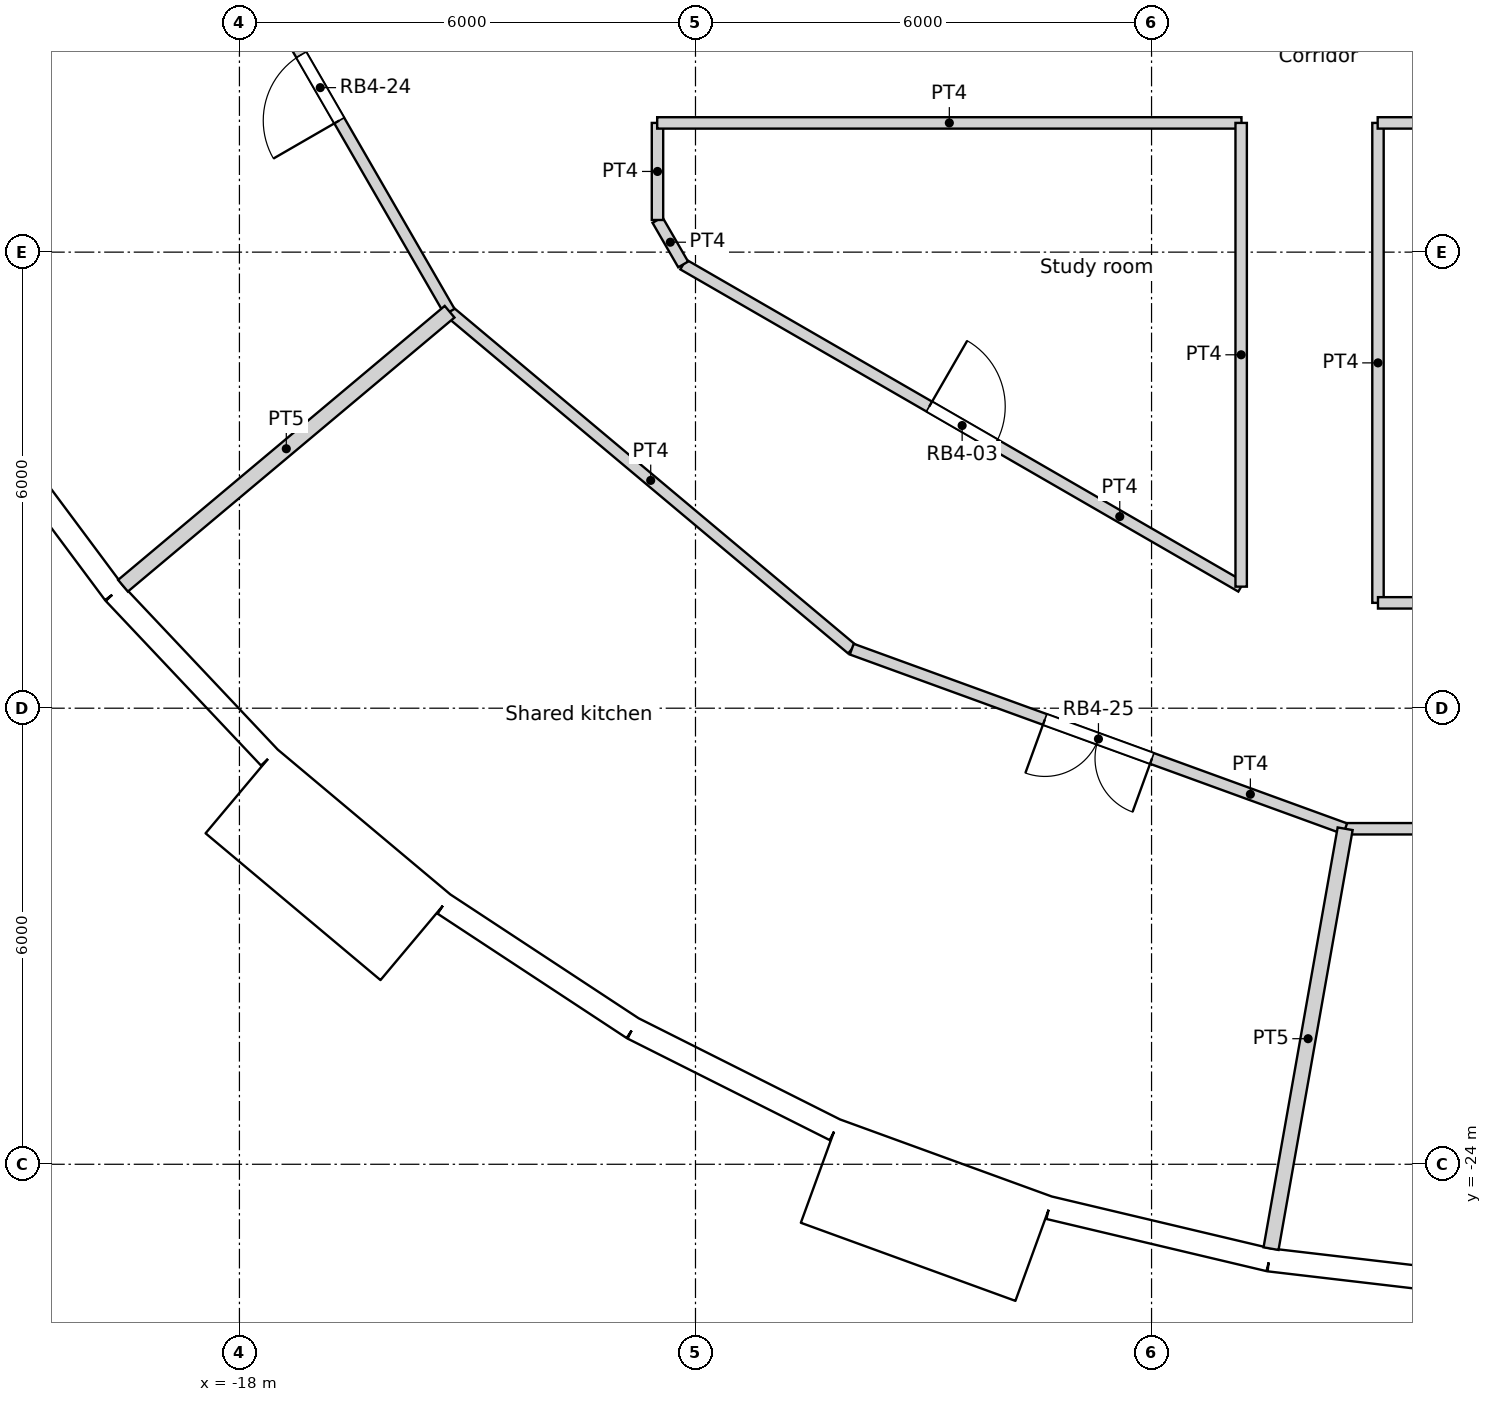
"""IFC4 building model, lengths in metres.
Left out: names, types, materials, properties, quantities, classifications, styles, units other than length and angle.
Written with IfcOpenShell. Run it as: python <this file> out.ifc"""

import sys

from ifc_helpers import new_model, si_unit, direction, frame, frame_2d, origin, origin_2d, place, context, subcontext, project, spatial, rectangle, circle, extrude, element, fill, save


model = new_model("IFC4")
c1 = context("Model", 3, precision=1e-05, world=origin(), true_north=direction((0.0, 1.0)))
c2 = subcontext(c1, "Body", "Model", "MODEL_VIEW")
j1 = project(units=[si_unit("LENGTHUNIT", "METRE"), si_unit("PLANEANGLEUNIT", "RADIAN")], contexts=[c1])
p1 = place(None, origin())
s1 = spatial("IfcSite", under=j1, at=p1, CompositionType="ELEMENT")
p2 = place(p1, origin())
s2 = spatial("IfcBuilding", under=s1, at=p2, CompositionType="ELEMENT")
p3 = place(p2, frame((0.0, 0.0, 158.4)))
s3 = spatial("IfcBuildingStorey", under=s2, at=p3, CompositionType="ELEMENT", Elevation=158.4)
for number, where, z_axis, x_axis in (
    (1, (-20.509, -13.489, 0.0), (0.0, 0.0, 1.0), (1.0, 0.0, 0.0)),
    (2, (-16.846, -17.855, 0.0), (0.0, 0.0, 1.0), (1.0, 0.0, 0.0)),
    (3, (-12.274, -21.259, 0.0), (0.0, 0.0, 1.0), (1.0, 0.0, 0.0)),
    (4, (-7.04, -23.516, 0.0), (0.0, 0.0, 1.0), (1.0, 0.0, 0.0)),
):
    element("IfcColumn", number, at=place(p3, frame(where, z_axis=z_axis, x_axis=x_axis)), inside=s3, PredefinedType="COLUMN", context=c2, shape_type="SweptSolid", body=[
        extrude(circle(Radius=0.6, at=origin_2d()), origin(), (0.0, 0.0, 1.0), 3.6),
    ])
for number, where, z_axis, x_axis in (
    (5, (-13.798, -12.802, 0.0), (0.0, 0.0, 1.0), (1.0, 0.0, 0.0)),
    (6, (-9.411, -16.301, 0.0), (0.0, 0.0, 1.0), (1.0, 0.0, 0.0)),
    (7, (-4.188, -18.35, 0.0), (0.0, 0.0, 1.0), (1.0, 0.0, 0.0)),
):
    element("IfcColumn", number, at=place(p3, frame(where, z_axis=z_axis, x_axis=x_axis)), inside=s3, PredefinedType="COLUMN", context=c2, shape_type="SweptSolid", body=[
        extrude(circle(Radius=0.65, at=origin_2d()), origin(), (0.0, 0.0, 1.0), 3.6),
    ])
p4 = place(p3, frame((-21.422, -14.101, 0.0), z_axis=(0.0, 0.0, 1.0), x_axis=(0.597197580538, -0.80209416517, 0.0)))
e8 = element("IfcWall", 8, at=p4, inside=s3, PredefinedType="SOLIDWALL", context=c2, shape_type="SweptSolid", body=[
    extrude(rectangle(XDim=2.973, YDim=0.3, at=frame_2d((1.486, 0.0))), origin(), (0.0, 0.0, 1.0), 3.3),
])
p5 = place(p4, frame((1.486, 0.0, 1.55)))
e9 = element("IfcOpeningElement", 9, at=p5, cuts=e8, PredefinedType="OPENING", context=c2, shape_type="SweptSolid", body=[
    extrude(circle(Radius=0.9, at=origin_2d()), frame((0.0, 0.16, 0.0), z_axis=(0.0, -1.0, 0.0), x_axis=(1.0, 0.0, 0.0)), (0.0, 0.0, 1.0), 0.32),
])
p6 = place(p3, frame((-19.647, -16.486, 0.0), z_axis=(0.0, 0.0, 1.0), x_axis=(0.686235184166, -0.727379730273, 0.0)))
e10 = element("IfcWall", 10, at=p6, inside=s3, PredefinedType="SOLIDWALL", context=c2, shape_type="SweptSolid", body=[
    extrude(rectangle(XDim=2.973, YDim=0.3, at=frame_2d((1.486, 0.0))), origin(), (0.0, 0.0, 1.0), 3.3),
])
p7 = place(p6, frame((1.486, 0.0, 1.55)))
e11 = element("IfcOpeningElement", 11, at=p7, cuts=e10, PredefinedType="OPENING", context=c2, shape_type="SweptSolid", body=[
    extrude(circle(Radius=0.9, at=origin_2d()), frame((0.0, 0.16, 0.0), z_axis=(0.0, -1.0, 0.0), x_axis=(1.0, 0.0, 0.0)), (0.0, 0.0, 1.0), 0.32),
])
p8 = place(p3, frame((-17.977, -19.09, -0.3), z_axis=(0.0, 0.0, 1.0), x_axis=(0.766022196139, -0.642814121673, 0.0)))
e12 = element("IfcWall", 12, at=p8, inside=s3, PredefinedType="ELEMENTEDWALL", context=c2, shape_type="SweptSolid", body=[
    extrude(rectangle(XDim=3.0, YDim=1.45, at=frame_2d((1.5, 0.0))), origin(), (0.0, 0.0, 1.0), 3.6),
])
p9 = place(p8, frame((1.5, 0.0, 1.85)))
e13 = element("IfcOpeningElement", 13, at=p9, cuts=e12, PredefinedType="OPENING", context=c2, shape_type="SweptSolid", body=[
    extrude(circle(Radius=0.9, at=origin_2d()), frame((0.0, 0.735, 0.0), z_axis=(0.0, -1.0, 0.0), x_axis=(1.0, 0.0, 0.0)), (0.0, 0.0, 1.0), 1.47),
])
p10 = place(p3, frame((-15.308, -20.578, 0.0), z_axis=(0.0, 0.0, 1.0), x_axis=(0.835470659512, -0.549535055382, 0.0)))
e14 = element("IfcWall", 14, at=p10, inside=s3, PredefinedType="SOLIDWALL", context=c2, shape_type="SweptSolid", body=[
    extrude(rectangle(XDim=2.973, YDim=0.3, at=frame_2d((1.487, 0.0))), origin(), (0.0, 0.0, 1.0), 3.3),
])
p11 = place(p10, frame((1.486, 0.0, 1.55)))
e15 = element("IfcOpeningElement", 15, at=p11, cuts=e14, PredefinedType="OPENING", context=c2, shape_type="SweptSolid", body=[
    extrude(circle(Radius=0.9, at=origin_2d()), frame((0.0, 0.16, 0.0), z_axis=(0.0, -1.0, 0.0), x_axis=(1.0, 0.0, 0.0)), (0.0, 0.0, 1.0), 0.32),
])
p12 = place(p3, frame((-12.824, -22.211, 0.0), z_axis=(0.0, 0.0, 1.0), x_axis=(0.893637442555, -0.448789618045, 0.0)))
e16 = element("IfcWall", 16, at=p12, inside=s3, PredefinedType="SOLIDWALL", context=c2, shape_type="SweptSolid", body=[
    extrude(rectangle(XDim=2.973, YDim=0.3, at=frame_2d((1.486, 0.0))), origin(), (0.0, 0.0, 1.0), 3.3),
])
p13 = place(p12, frame((1.486, 0.0, 1.55)))
e17 = element("IfcOpeningElement", 17, at=p13, cuts=e16, PredefinedType="OPENING", context=c2, shape_type="SweptSolid", body=[
    extrude(circle(Radius=0.9, at=origin_2d()), frame((0.0, 0.16, 0.0), z_axis=(0.0, -1.0, 0.0), x_axis=(1.0, 0.0, 0.0)), (0.0, 0.0, 1.0), 0.32),
])
p14 = place(p3, frame((-10.363, -24.087, -0.3), z_axis=(0.0, 0.0, 1.0), x_axis=(0.939686455819, -0.342037080957, 0.0)))
e18 = element("IfcWall", 18, at=p14, inside=s3, PredefinedType="ELEMENTEDWALL", context=c2, shape_type="SweptSolid", body=[
    extrude(rectangle(XDim=3.0, YDim=1.45, at=frame_2d((1.5, 0.0))), origin(), (0.0, 0.0, 1.0), 3.6),
])
p15 = place(p14, frame((1.5, 0.0, 1.85)))
e19 = element("IfcOpeningElement", 19, at=p15, cuts=e18, PredefinedType="OPENING", context=c2, shape_type="SweptSolid", body=[
    extrude(circle(Radius=0.9, at=origin_2d()), frame((0.0, 0.735, 0.0), z_axis=(0.0, -1.0, 0.0), x_axis=(1.0, 0.0, 0.0)), (0.0, 0.0, 1.0), 1.47),
])
p16 = place(p3, frame((-7.346, -24.572, 0.0), z_axis=(0.0, 0.0, 1.0), x_axis=(0.973049746156, -0.230595298102, 0.0)))
e20 = element("IfcWall", 20, at=p16, inside=s3, PredefinedType="SOLIDWALL", context=c2, shape_type="SweptSolid", body=[
    extrude(rectangle(XDim=2.973, YDim=0.3, at=frame_2d((1.486, 0.0))), origin(), (0.0, 0.0, 1.0), 3.3),
])
p17 = place(p16, frame((1.486, 0.0, 1.55)))
e21 = element("IfcOpeningElement", 21, at=p17, cuts=e20, PredefinedType="OPENING", context=c2, shape_type="SweptSolid", body=[
    extrude(circle(Radius=0.9, at=origin_2d()), frame((0.0, 0.16, 0.0), z_axis=(0.0, -1.0, 0.0), x_axis=(1.0, 0.0, 0.0)), (0.0, 0.0, 1.0), 0.32),
])
p18 = place(p3, frame((-4.454, -25.258, 0.0), z_axis=(0.0, 0.0, 1.0), x_axis=(0.993235542767, -0.116116995244, 0.0)))
e22 = element("IfcWall", 22, at=p18, inside=s3, PredefinedType="SOLIDWALL", context=c2, shape_type="SweptSolid", body=[
    extrude(rectangle(XDim=2.973, YDim=0.3, at=frame_2d((1.486, 0.0))), origin(), (0.0, 0.0, 1.0), 3.3),
])
p19 = place(p18, frame((1.486, 0.0, 1.55)))
e23 = element("IfcOpeningElement", 23, at=p19, cuts=e22, PredefinedType="OPENING", context=c2, shape_type="SweptSolid", body=[
    extrude(circle(Radius=0.9, at=origin_2d()), frame((0.0, 0.16, 0.0), z_axis=(0.0, -1.0, 0.0), x_axis=(1.0, 0.0, 0.0)), (0.0, 0.0, 1.0), 0.32),
])
p20 = place(p3, frame((-12.504, -10.3, 0.0), z_axis=(0.0, 0.0, 1.0), x_axis=(1.0, 0.0, 0.0)))
e24 = element("IfcWall", 24, at=p20, inside=s3, PredefinedType="PARTITIONING", context=c2, shape_type="SweptSolid", body=[
    extrude(rectangle(XDim=7.687, YDim=0.15, at=frame_2d((3.844, 0.0))), origin(), (0.0, 0.0, 1.0), 3.3),
])
p21 = place(p3, frame((-3.025, -10.3, 0.0), z_axis=(0.0, 0.0, 1.0), x_axis=(1.0, 0.0, 0.0)))
e25 = element("IfcWall", 25, at=p21, inside=s3, PredefinedType="PARTITIONING", context=c2, shape_type="SweptSolid", body=[
    extrude(rectangle(XDim=16.262, YDim=0.15, at=frame_2d((8.131, 0.0))), origin(), (0.0, 0.0, 1.0), 3.3),
])
p22 = place(p21, frame((7.287, 0.0, 0.0)))
e26 = element("IfcOpeningElement", 26, at=p22, cuts=e25, PredefinedType="OPENING", context=c2, shape_type="SweptSolid", body=[
    extrude(rectangle(XDim=0.95, YDim=2.1, at=frame_2d((0.475, 1.05))), frame((0.0, 0.075, 0.0), z_axis=(0.0, -1.0, 0.0), x_axis=(1.0, 0.0, 0.0)), (0.0, 0.0, 1.0), 0.15),
])
p23 = place(p3, frame((-12.5, -11.577, 0.0), z_axis=(0.0, 0.0, 1.0), x_axis=(0.0, 1.0, 0.0)))
e27 = element("IfcWall", 27, at=p23, inside=s3, PredefinedType="PARTITIONING", context=c2, shape_type="SweptSolid", body=[
    extrude(rectangle(XDim=1.277, YDim=0.15, at=frame_2d((0.638, 0.0))), origin(), (0.0, 0.0, 1.0), 3.3),
])
p24 = place(p3, frame((-12.5, -11.577, 0.0), z_axis=(0.0, 0.0, 1.0), x_axis=(0.500024767483, -0.866011103799, 0.0)))
e28 = element("IfcWall", 28, at=p24, inside=s3, PredefinedType="PARTITIONING", context=c2, shape_type="SweptSolid", body=[
    extrude(rectangle(XDim=0.676, YDim=0.15, at=frame_2d((0.338, 0.0))), origin(), (0.0, 0.0, 1.0), 3.3),
])
p25 = place(p3, frame((-18.688, -6.802, 0.0), z_axis=(0.0, 0.0, 1.0), x_axis=(0.499914202267, -0.866074933462, 0.0)))
e29 = element("IfcWall", 29, at=p25, inside=s3, PredefinedType="PARTITIONING", context=c2, shape_type="SweptSolid", body=[
    extrude(rectangle(XDim=6.907, YDim=0.15, at=frame_2d((3.454, 0.0))), origin(), (0.0, 0.0, 1.0), 3.3),
])
p26 = place(p25, frame((3.003, 0.0, 0.0)))
e30 = element("IfcOpeningElement", 30, at=p26, cuts=e29, PredefinedType="OPENING", context=c2, shape_type="SweptSolid", body=[
    extrude(rectangle(XDim=1.0, YDim=2.04, at=frame_2d((0.5, 1.02))), frame((0.0, 0.075, 0.0), z_axis=(0.0, -1.0, 0.0), x_axis=(1.0, 0.0, 0.0)), (0.0, 0.0, 1.0), 0.15),
])
p27 = place(p3, frame((-15.235, -12.784, 0.0), z_axis=(0.0, 0.0, 1.0), x_axis=(0.766192104565, -0.642611592567, 0.0)))
e31 = element("IfcWall", 31, at=p27, inside=s3, PredefinedType="PARTITIONING", context=c2, shape_type="SweptSolid", body=[
    extrude(rectangle(XDim=6.906, YDim=0.15, at=frame_2d((3.453, 0.0))), origin(), (0.0, 0.0, 1.0), 3.3),
])
p28 = place(p3, frame((-12.162, -12.162, 0.0), z_axis=(0.0, 0.0, 1.0), x_axis=(0.866004766557, -0.500035743023, 0.0)))
e32 = element("IfcWall", 32, at=p28, inside=s3, PredefinedType="PARTITIONING", context=c2, shape_type="SweptSolid", body=[
    extrude(rectangle(XDim=8.477, YDim=0.15, at=frame_2d((4.239, 0.0))), origin(), (0.0, 0.0, 1.0), 3.3),
])
p29 = place(p28, frame((3.738, 0.0, 0.0)))
e33 = element("IfcOpeningElement", 33, at=p29, cuts=e32, PredefinedType="OPENING", context=c2, shape_type="SweptSolid", body=[
    extrude(rectangle(XDim=1.0, YDim=2.04, at=frame_2d((0.5, 1.02))), frame((0.0, 0.075, 0.0), z_axis=(0.0, -1.0, 0.0), x_axis=(1.0, 0.0, 0.0)), (0.0, 0.0, 1.0), 0.15),
])
p30 = place(p3, frame((-4.821, -16.401, 0.0), z_axis=(0.0, 0.0, 1.0), x_axis=(0.0, 1.0, 0.0)))
e34 = element("IfcWall", 34, at=p30, inside=s3, PredefinedType="PARTITIONING", context=c2, shape_type="SweptSolid", body=[
    extrude(rectangle(XDim=6.101, YDim=0.15, at=frame_2d((3.05, 0.0))), origin(), (0.0, 0.0, 1.0), 3.3),
])
p31 = place(p3, frame((-3.021, -16.614, 0.0), z_axis=(0.0, 0.0, 1.0), x_axis=(0.0, 1.0, 0.0)))
e35 = element("IfcWall", 35, at=p31, inside=s3, PredefinedType="PARTITIONING", context=c2, shape_type="SweptSolid", body=[
    extrude(rectangle(XDim=6.314, YDim=0.15, at=frame_2d((3.157, 0.0))), origin(), (0.0, 0.0, 1.0), 3.3),
])
p32 = place(p3, frame((-3.021, -16.614, 0.0), z_axis=(0.0, 0.0, 1.0), x_axis=(1.0, 0.0, 0.0)))
e36 = element("IfcWall", 36, at=p32, inside=s3, PredefinedType="PARTITIONING", context=c2, shape_type="SweptSolid", body=[
    extrude(rectangle(XDim=7.473, YDim=0.15, at=frame_2d((3.736, 0.0))), origin(), (0.0, 0.0, 1.0), 3.3),
])
p33 = place(p3, frame((-9.944, -17.223, 0.0), z_axis=(0.0, 0.0, 1.0), x_axis=(0.939672634566, -0.342075050021, 0.0)))
e37 = element("IfcWall", 37, at=p33, inside=s3, PredefinedType="PARTITIONING", context=c2, shape_type="SweptSolid", body=[
    extrude(rectangle(XDim=6.908, YDim=0.15, at=frame_2d((3.454, 0.0))), origin(), (0.0, 0.0, 1.0), 3.3),
])
p34 = place(p33, frame((2.704, 0.0, 0.0)))
e38 = element("IfcOpeningElement", 38, at=p34, cuts=e37, PredefinedType="OPENING", context=c2, shape_type="SweptSolid", body=[
    extrude(rectangle(XDim=1.5, YDim=2.1, at=frame_2d((0.75, 1.05))), frame((0.0, 0.075, 0.0), z_axis=(0.0, -1.0, 0.0), x_axis=(1.0, 0.0, 0.0)), (0.0, 0.0, 1.0), 0.15),
])
p35 = place(p3, frame((-3.453, -19.586, 0.0), z_axis=(0.0, 0.0, 1.0), x_axis=(1.0, 0.0, 0.0)))
e39 = element("IfcWall", 39, at=p35, inside=s3, PredefinedType="PARTITIONING", context=c2, shape_type="SweptSolid", body=[
    extrude(rectangle(XDim=6.906, YDim=0.15, at=frame_2d((3.453, 0.0))), origin(), (0.0, 0.0, 1.0), 3.3),
])
p36 = place(p35, frame((2.103, 0.0, 0.0)))
e40 = element("IfcOpeningElement", 40, at=p36, cuts=e39, PredefinedType="OPENING", context=c2, shape_type="SweptSolid", body=[
    extrude(rectangle(XDim=1.8, YDim=2.1, at=frame_2d((0.9, 1.05))), frame((0.0, 0.075, 0.0), z_axis=(0.0, -1.0, 0.0), x_axis=(1.0, 0.0, 0.0)), (0.0, 0.0, 1.0), 0.15),
])
p37 = place(p3, frame((-19.532, -16.389, 0.0), z_axis=(0.0, 0.0, 1.0), x_axis=(0.76609059793, 0.642732600514, 0.0)))
e41 = element("IfcWall", 41, at=p37, inside=s3, PredefinedType="PARTITIONING", context=c2, shape_type="SweptSolid", body=[
    extrude(rectangle(XDim=5.609, YDim=0.2, at=frame_2d((2.804, 0.0))), origin(), (0.0, 0.0, 1.0), 3.3),
])
p38 = place(p3, frame((-4.428, -25.11, 0.0), z_axis=(0.0, 0.0, 1.0), x_axis=(0.17382754149, 0.984776109489, 0.0)))
e42 = element("IfcWall", 42, at=p38, inside=s3, PredefinedType="PARTITIONING", context=c2, shape_type="SweptSolid", body=[
    extrude(rectangle(XDim=5.61, YDim=0.2, at=frame_2d((2.805, 0.0))), origin(), (0.0, 0.0, 1.0), 3.3),
])
p39 = place(p5, origin())
e43 = element("IfcWindow", 43, at=p39, inside=s3, PartitioningType="SINGLE_PANEL", PredefinedType="WINDOW", context=c2, shape_type="SweptSolid", body=[
    extrude(circle(Radius=0.9, at=origin_2d()), frame((0.0, 0.12, 0.0), z_axis=(0.0, -1.0, 0.0), x_axis=(1.0, 0.0, 0.0)), (0.0, 0.0, 1.0), 0.1),
])
fill(e9, e43)
p40 = place(p7, origin())
e44 = element("IfcWindow", 44, at=p40, inside=s3, PartitioningType="SINGLE_PANEL", PredefinedType="WINDOW", context=c2, shape_type="SweptSolid", body=[
    extrude(circle(Radius=0.9, at=origin_2d()), frame((0.0, 0.12, 0.0), z_axis=(0.0, -1.0, 0.0), x_axis=(1.0, 0.0, 0.0)), (0.0, 0.0, 1.0), 0.1),
])
fill(e11, e44)
p41 = place(p9, origin())
e45 = element("IfcWindow", 45, at=p41, inside=s3, PartitioningType="SINGLE_PANEL", PredefinedType="WINDOW", context=c2, shape_type="SweptSolid", body=[
    extrude(circle(Radius=0.9, at=origin_2d()), frame((0.0, 0.695, 0.0), z_axis=(0.0, -1.0, 0.0), x_axis=(1.0, 0.0, 0.0)), (0.0, 0.0, 1.0), 0.1),
])
fill(e13, e45)
p42 = place(p11, origin())
e46 = element("IfcWindow", 46, at=p42, inside=s3, PartitioningType="SINGLE_PANEL", PredefinedType="WINDOW", context=c2, shape_type="SweptSolid", body=[
    extrude(circle(Radius=0.9, at=origin_2d()), frame((0.0, 0.12, 0.0), z_axis=(0.0, -1.0, 0.0), x_axis=(1.0, 0.0, 0.0)), (0.0, 0.0, 1.0), 0.1),
])
fill(e15, e46)
p43 = place(p13, origin())
e47 = element("IfcWindow", 47, at=p43, inside=s3, PartitioningType="SINGLE_PANEL", PredefinedType="WINDOW", context=c2, shape_type="SweptSolid", body=[
    extrude(circle(Radius=0.9, at=origin_2d()), frame((0.0, 0.12, 0.0), z_axis=(0.0, -1.0, 0.0), x_axis=(1.0, 0.0, 0.0)), (0.0, 0.0, 1.0), 0.1),
])
fill(e17, e47)
p44 = place(p15, origin())
e48 = element("IfcWindow", 48, at=p44, inside=s3, PartitioningType="SINGLE_PANEL", PredefinedType="WINDOW", context=c2, shape_type="SweptSolid", body=[
    extrude(circle(Radius=0.9, at=origin_2d()), frame((0.0, 0.695, 0.0), z_axis=(0.0, -1.0, 0.0), x_axis=(1.0, 0.0, 0.0)), (0.0, 0.0, 1.0), 0.1),
])
fill(e19, e48)
p45 = place(p17, origin())
e49 = element("IfcWindow", 49, at=p45, inside=s3, PartitioningType="SINGLE_PANEL", PredefinedType="WINDOW", context=c2, shape_type="SweptSolid", body=[
    extrude(circle(Radius=0.9, at=origin_2d()), frame((0.0, 0.12, 0.0), z_axis=(0.0, -1.0, 0.0), x_axis=(1.0, 0.0, 0.0)), (0.0, 0.0, 1.0), 0.1),
])
fill(e21, e49)
p46 = place(p19, origin())
e50 = element("IfcWindow", 50, at=p46, inside=s3, PartitioningType="SINGLE_PANEL", PredefinedType="WINDOW", context=c2, shape_type="SweptSolid", body=[
    extrude(circle(Radius=0.9, at=origin_2d()), frame((0.0, 0.12, 0.0), z_axis=(0.0, -1.0, 0.0), x_axis=(1.0, 0.0, 0.0)), (0.0, 0.0, 1.0), 0.1),
])
fill(e23, e50)
p47 = place(p29, origin())
e51 = element("IfcDoor", 51, at=p47, inside=s3, OperationType="SINGLE_SWING_LEFT", PredefinedType="DOOR", context=c2, shape_type="SweptSolid", body=[
    extrude(rectangle(XDim=1.0, YDim=2.04, at=frame_2d((0.5, 1.02))), frame((0.0, 0.025, 0.0), z_axis=(0.0, -1.0, 0.0), x_axis=(1.0, 0.0, 0.0)), (0.0, 0.0, 1.0), 0.05),
])
fill(e33, e51)
p48 = place(p26, origin())
e52 = element("IfcDoor", 52, at=p48, inside=s3, OperationType="SINGLE_SWING_LEFT", PredefinedType="DOOR", context=c2, shape_type="SweptSolid", body=[
    extrude(rectangle(XDim=1.0, YDim=2.04, at=frame_2d((0.5, 1.02))), frame((0.0, 0.025, 0.0), z_axis=(0.0, -1.0, 0.0), x_axis=(1.0, 0.0, 0.0)), (0.0, 0.0, 1.0), 0.05),
])
fill(e30, e52)
p49 = place(p34, origin())
e53 = element("IfcDoor", 53, at=p49, inside=s3, OperationType="DOUBLE_DOOR_SINGLE_SWING", PredefinedType="DOOR", context=c2, shape_type="SweptSolid", body=[
    extrude(rectangle(XDim=1.5, YDim=2.1, at=frame_2d((0.75, 1.05))), frame((0.0, 0.025, 0.0), z_axis=(0.0, -1.0, 0.0), x_axis=(1.0, 0.0, 0.0)), (0.0, 0.0, 1.0), 0.05),
])
fill(e38, e53)
save(model, sys.argv[1])
